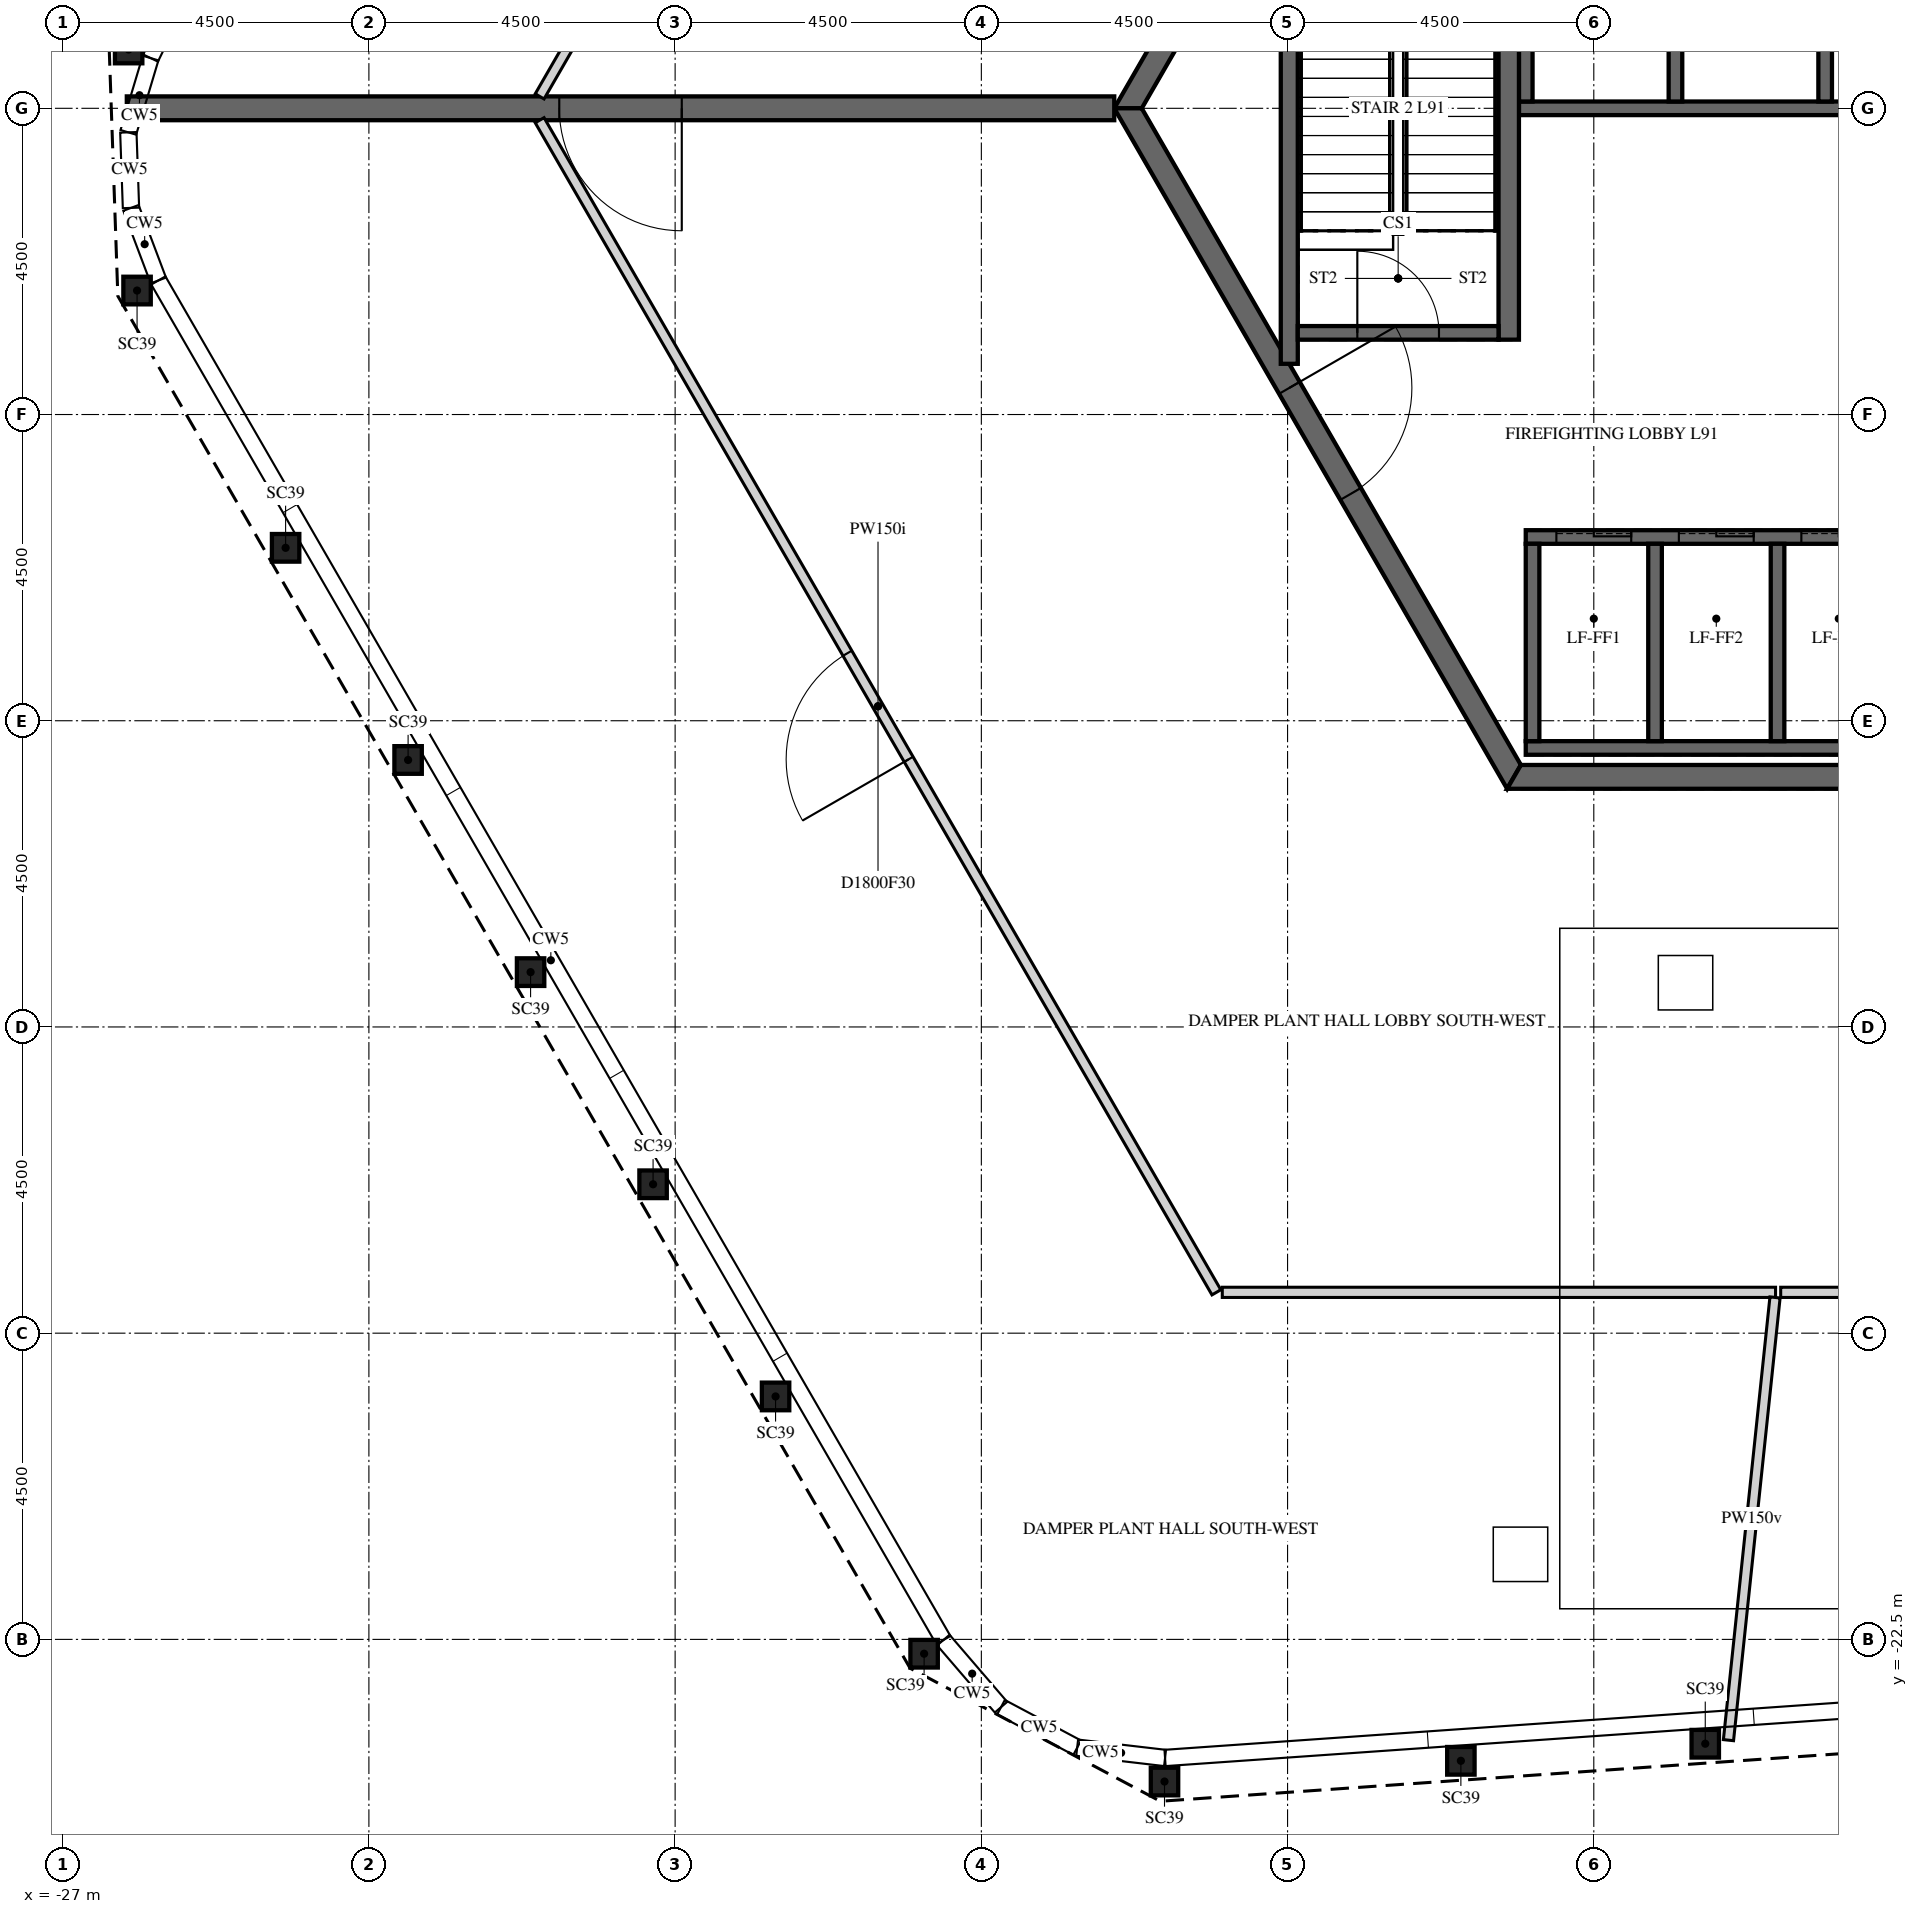
"""IFC4 building model, lengths in metres.
Left out: names, types, materials, properties, quantities, classifications, styles, units other than length and angle.
Written with IfcOpenShell. Run it as: python <this file> out.ifc"""

import sys

from ifc_helpers import new_model, si_unit, direction, frame, frame_2d, origin, origin_2d, place, context, subcontext, project, spatial, polyline, rectangle, i_section, outline, extrude, element, fill, save


model = new_model("IFC4")
c1 = context("Model", 3, precision=1e-05, world=origin(), true_north=direction((0.0, 1.0)))
c2 = subcontext(c1, "Body", "Model", "MODEL_VIEW")
j1 = project(units=[si_unit("LENGTHUNIT", "METRE"), si_unit("PLANEANGLEUNIT", "RADIAN")], contexts=[c1])
p1 = place(None, origin())
s1 = spatial("IfcSite", under=j1, at=p1, CompositionType="ELEMENT")
p2 = place(p1, origin())
s2 = spatial("IfcBuilding", under=s1, at=p2, CompositionType="ELEMENT")
p3 = place(p2, frame((0.0, 0.0, 376.8)))
s3 = spatial("IfcBuildingStorey", under=s2, at=p3, CompositionType="ELEMENT", Elevation=376.8)
for number, where, z_axis, x_axis in (
    (1, (-26.031, 0.864, 0.0), (0.0, 0.0, 1.0), (1.0, 0.0, 0.0)),
    (2, (-25.907, -2.678, 0.0), (0.0, 0.0, 1.0), (1.0, 0.0, 0.0)),
    (3, (-23.724, -6.459, 0.0), (0.0, 0.0, 1.0), (1.0, 0.0, 0.0)),
    (4, (-21.924, -9.577, 0.0), (0.0, 0.0, 1.0), (1.0, 0.0, 0.0)),
    (5, (-20.124, -12.694, 0.0), (0.0, 0.0, 1.0), (1.0, 0.0, 0.0)),
    (6, (-18.324, -15.812, 0.0), (0.0, 0.0, 1.0), (1.0, 0.0, 0.0)),
    (7, (-16.524, -18.93, 0.0), (0.0, 0.0, 1.0), (1.0, 0.0, 0.0)),
    (8, (-14.341, -22.711, 0.0), (0.0, 0.0, 1.0), (1.0, 0.0, 0.0)),
    (9, (-10.809, -24.589, 0.0), (0.0, 0.0, 1.0), (1.0, 0.0, 0.0)),
    (10, (-6.453, -24.284, 0.0), (0.0, 0.0, 1.0), (1.0, 0.0, 0.0)),
    (11, (-2.862, -24.033, 0.0), (0.0, 0.0, 1.0), (1.0, 0.0, 0.0)),
):
    element("IfcColumn", number, at=place(p3, frame(where, z_axis=z_axis, x_axis=x_axis)), inside=s3, PredefinedType="COLUMN", context=c2, shape_type="SweptSolid", body=[
        extrude(i_section(OverallWidth=0.403, OverallDepth=0.406, WebThickness=0.027, FlangeThickness=0.043, FilletRadius=0.015, at=origin_2d()), origin(), (0.0, 0.0, 1.0), 11.2),
    ])
p4 = place(p3, frame((-5.673, 9.825, -0.5), z_axis=(0.0, 0.0, 1.0), x_axis=(-0.499995046907, -0.866028263435, 0.0)))
e12 = element("IfcWall", 12, at=p4, inside=s3, PredefinedType="SHEAR", context=c2, shape_type="SweptSolid", body=[
    extrude(outline(polyline([(-0.101, -0.175), (11.446, -0.175), (11.244, 0.175), (0.101, 0.175), (-0.101, -0.175)])), origin(), (0.0, 0.0, 1.0), 11.7),
])
p5 = place(p4, frame((4.801, 0.0, 0.5)))
e13 = element("IfcOpeningElement", 13, at=p5, cuts=e12, PredefinedType="OPENING", context=c2, shape_type="SweptSolid", body=[
    extrude(rectangle(XDim=1.8, YDim=2.4, at=frame_2d((0.9, 1.2))), frame((0.0, 0.185, 0.0), z_axis=(0.0, -1.0, 0.0), x_axis=(1.0, 0.0, 0.0)), (0.0, 0.0, 1.0), 0.37),
])
p6 = place(p3, frame((-11.345, 0.0, -0.5), z_axis=(0.0, 0.0, 1.0), x_axis=(0.499995046907, -0.866028263435, 0.0)))
e14 = element("IfcWall", 14, at=p6, inside=s3, PredefinedType="SHEAR", context=c2, shape_type="SweptSolid", body=[
    extrude(outline(polyline([(-0.101, -0.175), (11.446, -0.175), (11.244, 0.175), (0.101, 0.175), (-0.101, -0.175)])), origin(), (0.0, 0.0, 1.0), 11.7),
])
p7 = place(p6, frame((4.744, 0.0, 0.5)))
e15 = element("IfcOpeningElement", 15, at=p7, cuts=e14, PredefinedType="OPENING", context=c2, shape_type="SweptSolid", body=[
    extrude(rectangle(XDim=1.8, YDim=2.4, at=frame_2d((0.9, 1.2))), frame((0.0, 0.185, 0.0), z_axis=(0.0, -1.0, 0.0), x_axis=(1.0, 0.0, 0.0)), (0.0, 0.0, 1.0), 0.37),
])
p8 = place(p3, frame((-5.673, -9.825, -0.5), z_axis=(0.0, 0.0, 1.0), x_axis=(1.0, 0.0, 0.0)))
e16 = element("IfcWall", 16, at=p8, inside=s3, PredefinedType="SHEAR", context=c2, shape_type="SweptSolid", body=[
    extrude(outline(polyline([(-0.101, -0.175), (11.446, -0.175), (11.244, 0.175), (0.101, 0.175), (-0.101, -0.175)])), origin(), (0.0, 0.0, 1.0), 11.7),
])
p9 = place(p3, frame((-11.547, 0.0, -0.5), z_axis=(0.0, 0.0, 1.0), x_axis=(-1.0, 0.0, 0.0)))
e17 = element("IfcWall", 17, at=p9, inside=s3, PredefinedType="SHEAR", context=c2, shape_type="SweptSolid", body=[
    extrude(rectangle(XDim=14.51, YDim=0.35, at=frame_2d((7.255, 0.0))), origin(), (0.0, 0.0, 1.0), 11.7),
])
p10 = place(p9, frame((6.355, 0.0, 0.5)))
e18 = element("IfcOpeningElement", 18, at=p10, cuts=e17, PredefinedType="OPENING", context=c2, shape_type="SweptSolid", body=[
    extrude(rectangle(XDim=1.8, YDim=2.4, at=frame_2d((0.9, 1.2))), frame((0.0, 0.185, 0.0), z_axis=(0.0, -1.0, 0.0), x_axis=(1.0, 0.0, 0.0)), (0.0, 0.0, 1.0), 0.37),
])
p11 = place(p3, frame((-5.6, 0.0, -0.25), z_axis=(0.0, 0.0, 1.0), x_axis=(1.0, 0.0, 0.0)))
e19 = element("IfcWall", 19, at=p11, inside=s3, PredefinedType="SHEAR", context=c2, shape_type="SweptSolid", body=[
    extrude(rectangle(XDim=11.2, YDim=0.2, at=frame_2d((5.6, 0.0))), origin(), (0.0, 0.0, 1.0), 11.45),
])
for number, where, z_axis, x_axis in (
    (20, (-5.5, 0.1, -0.25), (0.0, 0.0, 1.0), (0.0, 1.0, 0.0)),
    (21, (-3.3, 0.1, -0.25), (0.0, 0.0, 1.0), (0.0, 1.0, 0.0)),
    (22, (-1.1, 0.1, -0.25), (0.0, 0.0, 1.0), (0.0, 1.0, 0.0)),
):
    element("IfcWall", number, at=place(p3, frame(where, z_axis=z_axis, x_axis=x_axis)), inside=s3, PredefinedType="SHEAR", context=c2, shape_type="SweptSolid", body=[
        extrude(rectangle(XDim=3.1, YDim=0.2, at=frame_2d((1.55, 0.0))), origin(), (0.0, 0.0, 1.0), 11.45),
    ])
p12 = place(p3, frame((-5.5, -6.3, -0.25), z_axis=(0.0, 0.0, 1.0), x_axis=(1.0, 0.0, 0.0)))
e23 = element("IfcWall", 23, at=p12, inside=s3, PredefinedType="SHEAR", context=c2, shape_type="SweptSolid", body=[
    extrude(rectangle(XDim=9.2, YDim=0.2, at=frame_2d((4.6, 0.0))), origin(), (0.0, 0.0, 1.0), 11.45),
])
p13 = place(p12, frame((0.45, 0.0, 0.25)))
e24 = element("IfcOpeningElement", 24, at=p13, cuts=e23, PredefinedType="OPENING", context=c2, shape_type="SweptSolid", body=[
    extrude(rectangle(XDim=1.1, YDim=2.1, at=frame_2d((0.55, 1.05))), frame((0.0, 0.11, 0.0), z_axis=(0.0, -1.0, 0.0), x_axis=(1.0, 0.0, 0.0)), (0.0, 0.0, 1.0), 0.22),
])
p14 = place(p12, frame((2.25, 0.0, 0.25)))
e25 = element("IfcOpeningElement", 25, at=p14, cuts=e23, PredefinedType="OPENING", context=c2, shape_type="SweptSolid", body=[
    extrude(rectangle(XDim=1.1, YDim=2.1, at=frame_2d((0.55, 1.05))), frame((0.0, 0.11, 0.0), z_axis=(0.0, -1.0, 0.0), x_axis=(1.0, 0.0, 0.0)), (0.0, 0.0, 1.0), 0.22),
])
p15 = place(p12, frame((4.05, 0.0, 0.25)))
e26 = element("IfcOpeningElement", 26, at=p15, cuts=e23, PredefinedType="OPENING", context=c2, shape_type="SweptSolid", body=[
    extrude(rectangle(XDim=1.1, YDim=2.1, at=frame_2d((0.55, 1.05))), frame((0.0, 0.11, 0.0), z_axis=(0.0, -1.0, 0.0), x_axis=(1.0, 0.0, 0.0)), (0.0, 0.0, 1.0), 0.22),
])
p16 = place(p12, frame((5.85, 0.0, 0.25)))
e27 = element("IfcOpeningElement", 27, at=p16, cuts=e23, PredefinedType="OPENING", context=c2, shape_type="SweptSolid", body=[
    extrude(rectangle(XDim=1.1, YDim=2.1, at=frame_2d((0.55, 1.05))), frame((0.0, 0.11, 0.0), z_axis=(0.0, -1.0, 0.0), x_axis=(1.0, 0.0, 0.0)), (0.0, 0.0, 1.0), 0.22),
])
p17 = place(p12, frame((7.65, 0.0, 0.25)))
e28 = element("IfcOpeningElement", 28, at=p17, cuts=e23, PredefinedType="OPENING", context=c2, shape_type="SweptSolid", body=[
    extrude(rectangle(XDim=1.1, YDim=2.1, at=frame_2d((0.55, 1.05))), frame((0.0, 0.11, 0.0), z_axis=(0.0, -1.0, 0.0), x_axis=(1.0, 0.0, 0.0)), (0.0, 0.0, 1.0), 0.22),
])
p18 = place(p3, frame((-5.5, -9.4, -0.25), z_axis=(0.0, 0.0, 1.0), x_axis=(1.0, 0.0, 0.0)))
e29 = element("IfcWall", 29, at=p18, inside=s3, PredefinedType="SHEAR", context=c2, shape_type="SweptSolid", body=[
    extrude(rectangle(XDim=9.2, YDim=0.2, at=frame_2d((4.6, 0.0))), origin(), (0.0, 0.0, 1.0), 11.45),
])
for number, where, z_axis, x_axis in (
    (30, (-5.4, -9.3, -0.25), (0.0, 0.0, 1.0), (0.0, 1.0, 0.0)),
    (31, (-3.6, -9.3, -0.25), (0.0, 0.0, 1.0), (0.0, 1.0, 0.0)),
    (32, (-1.8, -9.3, -0.25), (0.0, 0.0, 1.0), (0.0, 1.0, 0.0)),
):
    element("IfcWall", number, at=place(p3, frame(where, z_axis=z_axis, x_axis=x_axis)), inside=s3, PredefinedType="SHEAR", context=c2, shape_type="SweptSolid", body=[
        extrude(rectangle(XDim=2.9, YDim=0.2, at=frame_2d((1.45, 0.0))), origin(), (0.0, 0.0, 1.0), 11.45),
    ])
p19 = place(p3, frame((-5.75, -3.4, -0.25), z_axis=(0.0, 0.0, 1.0), x_axis=(0.0, 1.0, 0.0)))
e33 = element("IfcWall", 33, at=p19, inside=s3, PredefinedType="SHEAR", context=c2, shape_type="SweptSolid", body=[
    extrude(rectangle(XDim=6.8, YDim=0.3, at=frame_2d((3.4, 0.0))), origin(), (0.0, 0.0, 1.0), 11.45),
])
p20 = place(p3, frame((-8.975, -3.755, -0.25), z_axis=(0.0, 0.0, 1.0), x_axis=(0.0, 1.0, 0.0)))
e34 = element("IfcWall", 34, at=p20, inside=s3, PredefinedType="SHEAR", context=c2, shape_type="SweptSolid", body=[
    extrude(rectangle(XDim=7.51, YDim=0.25, at=frame_2d((3.755, 0.0))), origin(), (0.0, 0.0, 1.0), 11.45),
])
p21 = place(p3, frame((-8.85, -3.3, -0.25), z_axis=(0.0, 0.0, 1.0), x_axis=(1.0, 0.0, 0.0)))
e35 = element("IfcWall", 35, at=p21, inside=s3, PredefinedType="SHEAR", context=c2, shape_type="SweptSolid", body=[
    extrude(rectangle(XDim=2.95, YDim=0.2, at=frame_2d((1.475, 0.0))), origin(), (0.0, 0.0, 1.0), 11.45),
])
p22 = place(p21, frame((0.875, 0.0, 0.25)))
e36 = element("IfcOpeningElement", 36, at=p22, cuts=e35, PredefinedType="OPENING", context=c2, shape_type="SweptSolid", body=[
    extrude(rectangle(XDim=1.2, YDim=2.4, at=frame_2d((0.6, 1.2))), frame((0.0, 0.11, 0.0), z_axis=(0.0, -1.0, 0.0), x_axis=(1.0, 0.0, 0.0)), (0.0, 0.0, 1.0), 0.22),
])
p23 = place(p3, frame((-10.046, -17.4, 0.0), z_axis=(0.0, 0.0, 1.0), x_axis=(-0.500011106667, 0.866018991252, 0.0)))
e37 = element("IfcWall", 37, at=p23, inside=s3, PredefinedType="PARTITIONING", context=c2, shape_type="SweptSolid", body=[
    extrude(rectangle(XDim=19.89, YDim=0.15, at=frame_2d((9.945, 0.0))), origin(), (0.0, 0.0, 1.0), 11.2),
])
p24 = place(p23, frame((9.045, 0.0, 0.0)))
e38 = element("IfcOpeningElement", 38, at=p24, cuts=e37, PredefinedType="OPENING", context=c2, shape_type="SweptSolid", body=[
    extrude(rectangle(XDim=1.8, YDim=2.1, at=frame_2d((0.9, 1.05))), frame((0.0, 0.085, 0.0), z_axis=(0.0, -1.0, 0.0), x_axis=(1.0, 0.0, 0.0)), (0.0, 0.0, 1.0), 0.17),
])
p25 = place(p3, frame((-9.959, -17.4, 0.0), z_axis=(0.0, 0.0, 1.0), x_axis=(1.0, 0.0, 0.0)))
e39 = element("IfcWall", 39, at=p25, inside=s3, PredefinedType="PARTITIONING", context=c2, shape_type="SweptSolid", body=[
    extrude(rectangle(XDim=8.13, YDim=0.15, at=frame_2d((4.065, 0.0))), origin(), (0.0, 0.0, 1.0), 11.2),
])
p26 = place(p3, frame((-19.991, 0.175, 0.0), z_axis=(0.0, 0.0, 1.0), x_axis=(0.500011106667, 0.866018991252, 0.0)))
e40 = element("IfcWall", 40, at=p26, inside=s3, PredefinedType="PARTITIONING", context=c2, shape_type="SweptSolid", body=[
    extrude(rectangle(XDim=19.89, YDim=0.15, at=frame_2d((9.945, 0.0))), origin(), (0.0, 0.0, 1.0), 11.2),
])
p27 = place(p26, frame((9.045, 0.0, 0.0)))
e41 = element("IfcOpeningElement", 41, at=p27, cuts=e40, PredefinedType="OPENING", context=c2, shape_type="SweptSolid", body=[
    extrude(rectangle(XDim=1.8, YDim=2.1, at=frame_2d((0.9, 1.05))), frame((0.0, 0.085, 0.0), z_axis=(0.0, -1.0, 0.0), x_axis=(1.0, 0.0, 0.0)), (0.0, 0.0, 1.0), 0.17),
])
p28 = place(p3, frame((-2.521, -23.981, 0.0), z_axis=(0.0, 0.0, 1.0), x_axis=(0.10457210654, 0.994517307307, 0.0)))
e42 = element("IfcWall", 42, at=p28, inside=s3, PredefinedType="PARTITIONING", context=c2, shape_type="SweptSolid", body=[
    extrude(rectangle(XDim=6.542, YDim=0.15, at=frame_2d((3.271, 0.0))), origin(), (0.0, 0.0, 1.0), 10.522),
])
p29 = place(p3, frame((9.844, -17.4, 0.0), z_axis=(0.0, 0.0, 1.0), x_axis=(-1.0, 0.0, 0.0)))
e43 = element("IfcWall", 43, at=p29, inside=s3, PredefinedType="PARTITIONING", context=c2, shape_type="SweptSolid", body=[
    extrude(rectangle(XDim=11.598, YDim=0.15, at=frame_2d((5.799, 0.0))), origin(), (0.0, 0.0, 1.0), 11.2),
])
p30 = place(p29, frame((5.299, 0.0, 0.0)))
e44 = element("IfcOpeningElement", 44, at=p30, cuts=e43, PredefinedType="OPENING", context=c2, shape_type="SweptSolid", body=[
    extrude(rectangle(XDim=1.0, YDim=2.1, at=frame_2d((0.5, 1.05))), frame((0.0, 0.085, 0.0), z_axis=(0.0, -1.0, 0.0), x_axis=(1.0, 0.0, 0.0)), (0.0, 0.0, 1.0), 0.17),
])
p31 = place(p7, origin())
e45 = element("IfcDoor", 45, at=p31, inside=s3, OperationType="DOUBLE_DOOR_SINGLE_SWING", PredefinedType="DOOR", context=c2, shape_type="SweptSolid", body=[
    extrude(rectangle(XDim=1.8, YDim=2.4, at=frame_2d((0.9, 1.2))), frame((0.0, 0.025, 0.0), z_axis=(0.0, -1.0, 0.0), x_axis=(1.0, 0.0, 0.0)), (0.0, 0.0, 1.0), 0.05),
])
fill(e15, e45)
p32 = place(p10, origin())
e46 = element("IfcDoor", 46, at=p32, inside=s3, OperationType="DOUBLE_DOOR_SINGLE_SWING", PredefinedType="DOOR", context=c2, shape_type="SweptSolid", body=[
    extrude(rectangle(XDim=1.8, YDim=2.4, at=frame_2d((0.9, 1.2))), frame((0.0, 0.025, 0.0), z_axis=(0.0, -1.0, 0.0), x_axis=(1.0, 0.0, 0.0)), (0.0, 0.0, 1.0), 0.05),
])
fill(e18, e46)
p33 = place(p22, origin())
e47 = element("IfcDoor", 47, at=p33, inside=s3, OperationType="SINGLE_SWING_LEFT", PredefinedType="DOOR", context=c2, shape_type="SweptSolid", body=[
    extrude(rectangle(XDim=1.2, YDim=2.4, at=frame_2d((0.6, 1.2))), frame((0.0, 0.025, 0.0), z_axis=(0.0, -1.0, 0.0), x_axis=(1.0, 0.0, 0.0)), (0.0, 0.0, 1.0), 0.05),
])
fill(e36, e47)
p34 = place(p13, origin())
e48 = element("IfcDoor", 48, at=p34, inside=s3, OperationType="SLIDING_TO_LEFT", PredefinedType="DOOR", context=c2, shape_type="SweptSolid", body=[
    extrude(rectangle(XDim=1.1, YDim=2.1, at=frame_2d((0.55, 1.05))), frame((0.0, 0.025, 0.0), z_axis=(0.0, -1.0, 0.0), x_axis=(1.0, 0.0, 0.0)), (0.0, 0.0, 1.0), 0.05),
])
fill(e24, e48)
p35 = place(p14, origin())
e49 = element("IfcDoor", 49, at=p35, inside=s3, OperationType="SLIDING_TO_LEFT", PredefinedType="DOOR", context=c2, shape_type="SweptSolid", body=[
    extrude(rectangle(XDim=1.1, YDim=2.1, at=frame_2d((0.55, 1.05))), frame((0.0, 0.025, 0.0), z_axis=(0.0, -1.0, 0.0), x_axis=(1.0, 0.0, 0.0)), (0.0, 0.0, 1.0), 0.05),
])
fill(e25, e49)
p36 = place(p15, origin())
e50 = element("IfcDoor", 50, at=p36, inside=s3, OperationType="SLIDING_TO_LEFT", PredefinedType="DOOR", context=c2, shape_type="SweptSolid", body=[
    extrude(rectangle(XDim=1.1, YDim=2.1, at=frame_2d((0.55, 1.05))), frame((0.0, 0.025, 0.0), z_axis=(0.0, -1.0, 0.0), x_axis=(1.0, 0.0, 0.0)), (0.0, 0.0, 1.0), 0.05),
])
fill(e26, e50)
p37 = place(p24, origin())
e51 = element("IfcDoor", 51, at=p37, inside=s3, OperationType="DOUBLE_DOOR_SINGLE_SWING", PredefinedType="DOOR", context=c2, shape_type="SweptSolid", body=[
    extrude(rectangle(XDim=1.8, YDim=2.1, at=frame_2d((0.9, 1.05))), frame((0.0, 0.025, 0.0), z_axis=(0.0, -1.0, 0.0), x_axis=(1.0, 0.0, 0.0)), (0.0, 0.0, 1.0), 0.05),
])
fill(e38, e51)
save(model, sys.argv[1])
